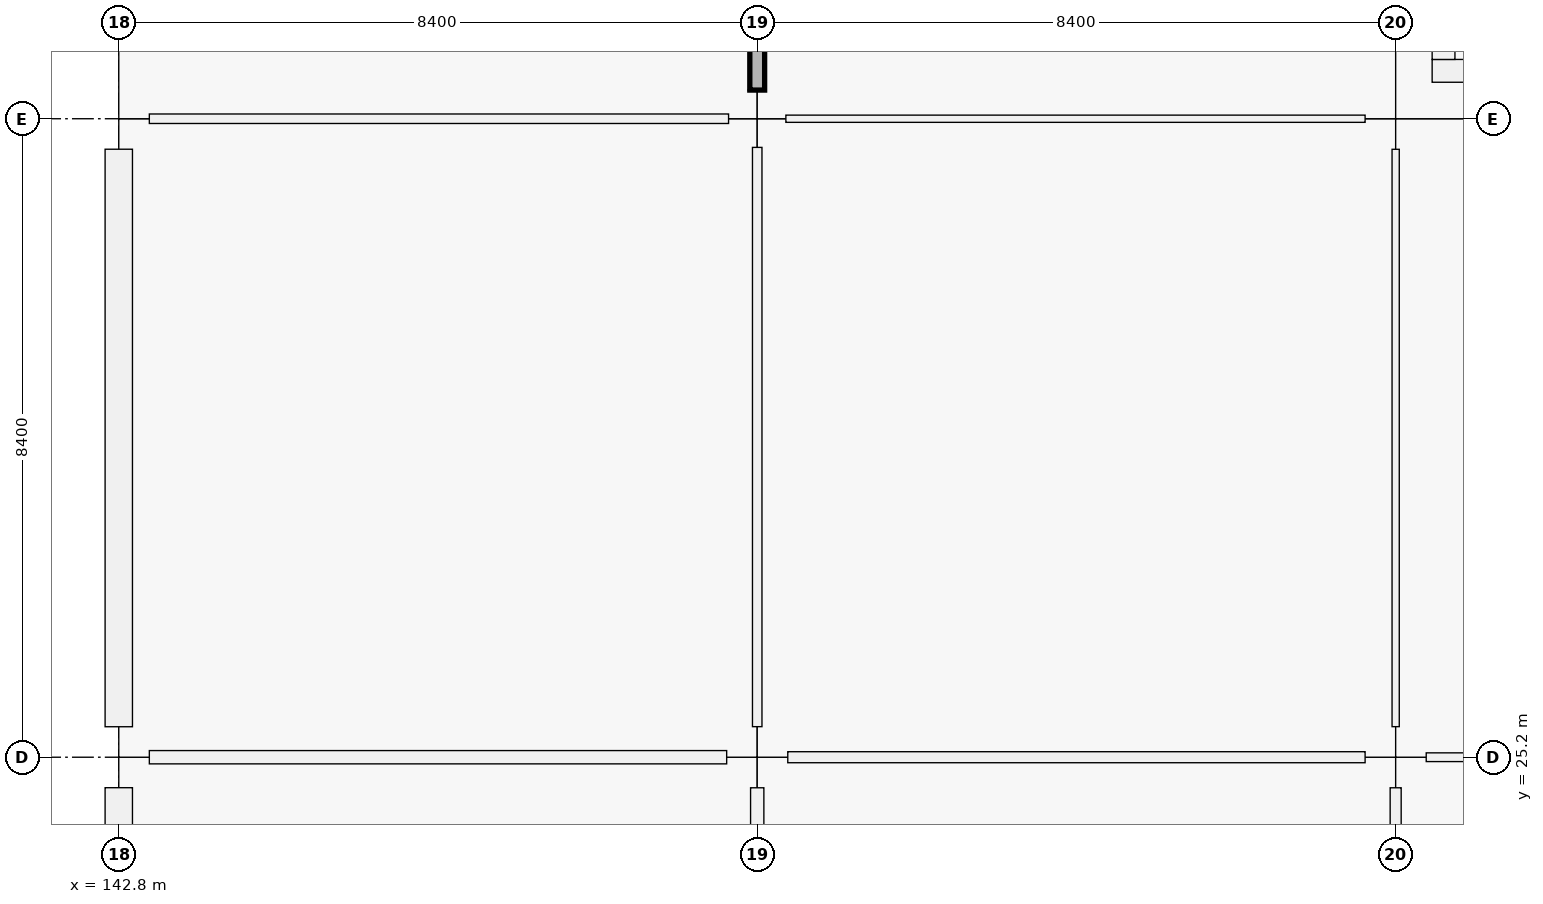
"""IFC4 building model, lengths in metres.
Left out: names, types, materials, properties, quantities, classifications, styles, units other than length and angle.
Written with IfcOpenShell. Run it as: python <this file> out.ifc"""

import sys

from ifc_helpers import new_model, si_unit, direction, frame, frame_2d, origin, origin_2d, place, context, subcontext, project, spatial, rectangle, extrude, element, fill, save


model = new_model("IFC4")
c1 = context("Model", 3, precision=1e-05, world=origin(), true_north=direction((0.0, 1.0)))
c2 = subcontext(c1, "Body", "Model", "MODEL_VIEW")
j1 = project(units=[si_unit("LENGTHUNIT", "METRE"), si_unit("PLANEANGLEUNIT", "RADIAN")], contexts=[c1])
p1 = place(None, origin())
s1 = spatial("IfcSite", under=j1, at=p1, CompositionType="ELEMENT")
p2 = place(p1, origin())
s2 = spatial("IfcBuilding", under=s1, at=p2, CompositionType="ELEMENT")
p3 = place(p2, origin())
s3 = spatial("IfcBuildingStorey", under=s2, at=p3, CompositionType="ELEMENT", Elevation=0.0)
for number, where, z_axis, x_axis in (
    (1, (142.8, 25.2, 0.0), (0.0, 0.0, 1.0), (1.0, 0.0, 0.0)),
    (2, (142.8, 33.6, 0.0), (0.0, 0.0, 1.0), (1.0, 0.0, 0.0)),
    (3, (151.2, 25.2, 0.0), (0.0, 0.0, 1.0), (1.0, 0.0, 0.0)),
):
    element("IfcColumn", number, at=place(p3, frame(where, z_axis=z_axis, x_axis=x_axis)), inside=s3, PredefinedType="COLUMN", context=c2, shape_type="SweptSolid", body=[
        extrude(rectangle(XDim=0.8, YDim=0.8, at=origin_2d()), origin(), (0.0, 0.0, 1.0), 5.76),
    ])
p4 = place(p3, frame((151.2, 33.6, 0.0), z_axis=(0.0, 0.0, 1.0), x_axis=(1.0, 0.0, 0.0)))
e4 = element("IfcColumn", 4, at=p4, inside=s3, PredefinedType="COLUMN", context=c2, shape_type="SweptSolid", body=[
    extrude(rectangle(XDim=0.75, YDim=0.75, at=origin_2d()), origin(), (0.0, 0.0, 1.0), 5.51),
])
for number, where, z_axis, x_axis in (
    (5, (159.6, 25.2, 0.0), (0.0, 0.0, 1.0), (1.0, 0.0, 0.0)),
    (6, (159.6, 33.6, 0.0), (0.0, 0.0, 1.0), (1.0, 0.0, 0.0)),
):
    element("IfcColumn", number, at=place(p3, frame(where, z_axis=z_axis, x_axis=x_axis)), inside=s3, PredefinedType="COLUMN", context=c2, shape_type="SweptSolid", body=[
        extrude(rectangle(XDim=0.8, YDim=0.8, at=origin_2d()), origin(), (0.0, 0.0, 1.0), 5.76),
    ])
p5 = place(p3, frame((142.8, 17.201, 0.0), z_axis=(0.0, 0.0, 1.0), x_axis=(0.0, 1.0, 0.0)))
e7 = element("IfcWall", 7, at=p5, inside=s3, PredefinedType="SOLIDWALL", context=c2, shape_type="SweptSolid", body=[
    extrude(rectangle(XDim=7.598, YDim=0.36, at=frame_2d((3.799, 0.0))), origin(), (0.0, 0.0, 1.0), 4.7),
])
p6 = place(p5, frame((3.024, 0.0, 0.9)))
e8 = element("IfcOpeningElement", 8, at=p6, cuts=e7, PredefinedType="OPENING", context=c2, shape_type="SweptSolid", body=[
    extrude(rectangle(XDim=1.55, YDim=1.6, at=frame_2d((0.775, 0.8))), frame((0.0, 0.18, 0.0), z_axis=(0.0, -1.0, 0.0), x_axis=(1.0, 0.0, 0.0)), (0.0, 0.0, 1.0), 0.36),
])
p7 = place(p3, frame((142.8, 25.601, 0.0), z_axis=(0.0, 0.0, 1.0), x_axis=(0.0, 1.0, 0.0)))
e9 = element("IfcWall", 9, at=p7, inside=s3, PredefinedType="SOLIDWALL", context=c2, shape_type="SweptSolid", body=[
    extrude(rectangle(XDim=7.598, YDim=0.36, at=frame_2d((3.799, 0.0))), origin(), (0.0, 0.0, 1.0), 4.7),
])
p8 = place(p7, frame((2.774, 0.0, 0.9)))
e10 = element("IfcOpeningElement", 10, at=p8, cuts=e9, PredefinedType="OPENING", context=c2, shape_type="SweptSolid", body=[
    extrude(rectangle(XDim=2.05, YDim=1.45, at=frame_2d((1.025, 0.725))), frame((0.0, 0.18, 0.0), z_axis=(0.0, -1.0, 0.0), x_axis=(1.0, 0.0, 0.0)), (0.0, 0.0, 1.0), 0.36),
])
p9 = place(p3, frame((167.52, 34.23, 0.0), z_axis=(0.0, 0.0, 1.0), x_axis=(-1.0, 0.0, 0.0)))
e11 = element("IfcWall", 11, at=p9, inside=s3, PredefinedType="SHEAR", context=c2, shape_type="SweptSolid", body=[
    extrude(rectangle(XDim=7.44, YDim=0.3, at=frame_2d((3.72, 0.0))), origin(), (0.0, 0.0, 1.0), 5.76),
])
p10 = place(p9, frame((1.28, 0.0, 0.0)))
e12 = element("IfcOpeningElement", 12, at=p10, cuts=e11, PredefinedType="OPENING", context=c2, shape_type="SweptSolid", body=[
    extrude(rectangle(XDim=1.5, YDim=2.15, at=frame_2d((0.75, 1.075))), frame((0.0, 0.15, 0.0), z_axis=(0.0, -1.0, 0.0), x_axis=(1.0, 0.0, 0.0)), (0.0, 0.0, 1.0), 0.3),
])
p11 = place(p3, frame((160.23, 34.38, 0.0), z_axis=(0.0, 0.0, 1.0), x_axis=(0.0, 1.0, 0.0)))
e13 = element("IfcWall", 13, at=p11, inside=s3, PredefinedType="SHEAR", context=c2, shape_type="SweptSolid", body=[
    extrude(rectangle(XDim=6.84, YDim=0.3, at=frame_2d((3.42, 0.0))), origin(), (0.0, 0.0, 1.0), 5.76),
])
p12 = place(p3, frame((143.202, 25.2, 0.0), z_axis=(0.0, 0.0, 1.0), x_axis=(1.0, 0.0, 0.0)))
e14 = element("IfcWall", 14, at=p12, inside=s3, PredefinedType="PARTITIONING", context=c2, shape_type="SweptSolid", body=[
    extrude(rectangle(XDim=7.596, YDim=0.175, at=frame_2d((3.798, 0.0))), origin(), (0.0, 0.0, 1.0), 3.66),
])
p13 = place(p12, frame((3.333, 0.0, 0.0)))
e15 = element("IfcOpeningElement", 15, at=p13, cuts=e14, PredefinedType="OPENING", context=c2, shape_type="SweptSolid", body=[
    extrude(rectangle(XDim=0.93, YDim=2.12, at=frame_2d((0.465, 1.06))), frame((0.0, 0.087, 0.0), z_axis=(0.0, -1.0, 0.0), x_axis=(1.0, 0.0, 0.0)), (0.0, 0.0, 1.0), 0.175),
])
p14 = place(p3, frame((143.202, 33.6, 0.0), z_axis=(0.0, 0.0, 1.0), x_axis=(1.0, 0.0, 0.0)))
e16 = element("IfcWall", 16, at=p14, inside=s3, PredefinedType="PARTITIONING", context=c2, shape_type="SweptSolid", body=[
    extrude(rectangle(XDim=7.621, YDim=0.125, at=frame_2d((3.811, 0.0))), origin(), (0.0, 0.0, 1.0), 3.66),
])
p15 = place(p14, frame((3.271, 0.0, 0.0)))
e17 = element("IfcOpeningElement", 17, at=p15, cuts=e16, PredefinedType="OPENING", context=c2, shape_type="SweptSolid", body=[
    extrude(rectangle(XDim=1.08, YDim=2.25, at=frame_2d((0.54, 1.125))), frame((0.0, 0.062, 0.0), z_axis=(0.0, -1.0, 0.0), x_axis=(1.0, 0.0, 0.0)), (0.0, 0.0, 1.0), 0.125),
])
p16 = place(p3, frame((151.602, 25.2, 0.0), z_axis=(0.0, 0.0, 1.0), x_axis=(1.0, 0.0, 0.0)))
e18 = element("IfcWall", 18, at=p16, inside=s3, PredefinedType="PARTITIONING", context=c2, shape_type="SweptSolid", body=[
    extrude(rectangle(XDim=7.596, YDim=0.145, at=frame_2d((3.798, 0.0))), origin(), (0.0, 0.0, 1.0), 3.66),
])
p17 = place(p16, frame((3.278, 0.0, 0.0)))
e19 = element("IfcOpeningElement", 19, at=p17, cuts=e18, PredefinedType="OPENING", context=c2, shape_type="SweptSolid", body=[
    extrude(rectangle(XDim=1.04, YDim=2.2, at=frame_2d((0.52, 1.1))), frame((0.0, 0.073, 0.0), z_axis=(0.0, -1.0, 0.0), x_axis=(1.0, 0.0, 0.0)), (0.0, 0.0, 1.0), 0.145),
])
p18 = place(p3, frame((151.577, 33.6, 0.0), z_axis=(0.0, 0.0, 1.0), x_axis=(1.0, 0.0, 0.0)))
e20 = element("IfcWall", 20, at=p18, inside=s3, PredefinedType="PARTITIONING", context=c2, shape_type="SweptSolid", body=[
    extrude(rectangle(XDim=7.621, YDim=0.095, at=frame_2d((3.811, 0.0))), origin(), (0.0, 0.0, 1.0), 3.66),
])
p19 = place(p18, frame((3.311, 0.0, 0.0)))
e21 = element("IfcOpeningElement", 21, at=p19, cuts=e20, PredefinedType="OPENING", context=c2, shape_type="SweptSolid", body=[
    extrude(rectangle(XDim=1.0, YDim=2.2, at=frame_2d((0.5, 1.1))), frame((0.0, 0.047, 0.0), z_axis=(0.0, -1.0, 0.0), x_axis=(1.0, 0.0, 0.0)), (0.0, 0.0, 1.0), 0.095),
])
p20 = place(p3, frame((160.002, 25.2, 0.0), z_axis=(0.0, 0.0, 1.0), x_axis=(1.0, 0.0, 0.0)))
e22 = element("IfcWall", 22, at=p20, inside=s3, PredefinedType="PARTITIONING", context=c2, shape_type="SweptSolid", body=[
    extrude(rectangle(XDim=7.596, YDim=0.115, at=frame_2d((3.798, 0.0))), origin(), (0.0, 0.0, 1.0), 3.66),
])
p21 = place(p20, frame((3.268, 0.0, 0.0)))
e23 = element("IfcOpeningElement", 23, at=p21, cuts=e22, PredefinedType="OPENING", context=c2, shape_type="SweptSolid", body=[
    extrude(rectangle(XDim=1.06, YDim=2.25, at=frame_2d((0.53, 1.125))), frame((0.0, 0.058, 0.0), z_axis=(0.0, -1.0, 0.0), x_axis=(1.0, 0.0, 0.0)), (0.0, 0.0, 1.0), 0.115),
])
p22 = place(p3, frame((151.2, 17.202, 0.0), z_axis=(0.0, 0.0, 1.0), x_axis=(0.0, 1.0, 0.0)))
e24 = element("IfcWall", 24, at=p22, inside=s3, PredefinedType="PARTITIONING", context=c2, shape_type="SweptSolid", body=[
    extrude(rectangle(XDim=7.596, YDim=0.175, at=frame_2d((3.798, 0.0))), origin(), (0.0, 0.0, 1.0), 3.66),
])
p23 = place(p22, frame((3.278, 0.0, 0.0)))
e25 = element("IfcOpeningElement", 25, at=p23, cuts=e24, PredefinedType="OPENING", context=c2, shape_type="SweptSolid", body=[
    extrude(rectangle(XDim=1.04, YDim=2.2, at=frame_2d((0.52, 1.1))), frame((0.0, 0.087, 0.0), z_axis=(0.0, -1.0, 0.0), x_axis=(1.0, 0.0, 0.0)), (0.0, 0.0, 1.0), 0.175),
])
p24 = place(p3, frame((151.2, 25.602, 0.0), z_axis=(0.0, 0.0, 1.0), x_axis=(0.0, 1.0, 0.0)))
e26 = element("IfcWall", 26, at=p24, inside=s3, PredefinedType="PARTITIONING", context=c2, shape_type="SweptSolid", body=[
    extrude(rectangle(XDim=7.621, YDim=0.125, at=frame_2d((3.811, 0.0))), origin(), (0.0, 0.0, 1.0), 3.66),
])
p25 = place(p24, frame((3.301, 0.0, 0.0)))
e27 = element("IfcOpeningElement", 27, at=p25, cuts=e26, PredefinedType="OPENING", context=c2, shape_type="SweptSolid", body=[
    extrude(rectangle(XDim=1.02, YDim=2.2, at=frame_2d((0.51, 1.1))), frame((0.0, 0.062, 0.0), z_axis=(0.0, -1.0, 0.0), x_axis=(1.0, 0.0, 0.0)), (0.0, 0.0, 1.0), 0.125),
])
p26 = place(p3, frame((151.2, 33.977, 0.0), z_axis=(0.0, 0.0, 1.0), x_axis=(0.0, 1.0, 0.0)))
e28 = element("IfcWall", 28, at=p26, inside=s3, PredefinedType="PARTITIONING", context=c2, shape_type="SweptSolid", body=[
    extrude(rectangle(XDim=7.671, YDim=0.195, at=frame_2d((3.835, 0.0))), origin(), (0.0, 0.0, 1.0), 3.66),
])
p27 = place(p26, frame((3.336, 0.0, 0.0)))
e29 = element("IfcOpeningElement", 29, at=p27, cuts=e28, PredefinedType="OPENING", context=c2, shape_type="SweptSolid", body=[
    extrude(rectangle(XDim=1.0, YDim=2.2, at=frame_2d((0.5, 1.1))), frame((0.0, 0.098, 0.0), z_axis=(0.0, -1.0, 0.0), x_axis=(1.0, 0.0, 0.0)), (0.0, 0.0, 1.0), 0.195),
])
p28 = place(p3, frame((159.6, 17.202, 0.0), z_axis=(0.0, 0.0, 1.0), x_axis=(0.0, 1.0, 0.0)))
e30 = element("IfcWall", 30, at=p28, inside=s3, PredefinedType="PARTITIONING", context=c2, shape_type="SweptSolid", body=[
    extrude(rectangle(XDim=7.596, YDim=0.145, at=frame_2d((3.798, 0.0))), origin(), (0.0, 0.0, 1.0), 3.66),
])
p29 = place(p28, frame((3.273, 0.0, 0.0)))
e31 = element("IfcOpeningElement", 31, at=p29, cuts=e30, PredefinedType="OPENING", context=c2, shape_type="SweptSolid", body=[
    extrude(rectangle(XDim=1.05, YDim=2.12, at=frame_2d((0.525, 1.06))), frame((0.0, 0.073, 0.0), z_axis=(0.0, -1.0, 0.0), x_axis=(1.0, 0.0, 0.0)), (0.0, 0.0, 1.0), 0.145),
])
p30 = place(p3, frame((159.6, 25.602, 0.0), z_axis=(0.0, 0.0, 1.0), x_axis=(0.0, 1.0, 0.0)))
e32 = element("IfcWall", 32, at=p30, inside=s3, PredefinedType="PARTITIONING", context=c2, shape_type="SweptSolid", body=[
    extrude(rectangle(XDim=7.596, YDim=0.095, at=frame_2d((3.798, 0.0))), origin(), (0.0, 0.0, 1.0), 3.66),
])
p31 = place(p30, frame((3.328, 0.0, 0.0)))
e33 = element("IfcOpeningElement", 33, at=p31, cuts=e32, PredefinedType="OPENING", context=c2, shape_type="SweptSolid", body=[
    extrude(rectangle(XDim=0.94, YDim=2.15, at=frame_2d((0.47, 1.075))), frame((0.0, 0.047, 0.0), z_axis=(0.0, -1.0, 0.0), x_axis=(1.0, 0.0, 0.0)), (0.0, 0.0, 1.0), 0.095),
])
p32 = place(p8, origin())
e34 = element("IfcWindow", 34, at=p32, inside=s3, PartitioningType="SINGLE_PANEL", PredefinedType="WINDOW", context=c2, shape_type="SweptSolid", body=[
    extrude(rectangle(XDim=2.05, YDim=1.45, at=frame_2d((1.025, 0.725))), frame((0.0, 0.03, 0.0), z_axis=(0.0, -1.0, 0.0), x_axis=(1.0, 0.0, 0.0)), (0.0, 0.0, 1.0), 0.06),
])
fill(e10, e34)
p33 = place(p31, origin())
e35 = element("IfcDoor", 35, at=p33, inside=s3, OperationType="SINGLE_SWING_RIGHT", PredefinedType="DOOR", context=c2, shape_type="SweptSolid", body=[
    extrude(rectangle(XDim=0.94, YDim=2.15, at=frame_2d((0.47, 1.075))), frame((0.0, 0.025, 0.0), z_axis=(0.0, -1.0, 0.0), x_axis=(1.0, 0.0, 0.0)), (0.0, 0.0, 1.0), 0.05),
])
fill(e33, e35)
p34 = place(p13, origin())
e36 = element("IfcDoor", 36, at=p34, inside=s3, OperationType="SINGLE_SWING_RIGHT", PredefinedType="DOOR", context=c2, shape_type="SweptSolid", body=[
    extrude(rectangle(XDim=0.93, YDim=2.12, at=frame_2d((0.465, 1.06))), frame((0.0, 0.025, 0.0), z_axis=(0.0, -1.0, 0.0), x_axis=(1.0, 0.0, 0.0)), (0.0, 0.0, 1.0), 0.05),
])
fill(e15, e36)
p35 = place(p15, origin())
e37 = element("IfcDoor", 37, at=p35, inside=s3, OperationType="SINGLE_SWING_LEFT", PredefinedType="DOOR", context=c2, shape_type="SweptSolid", body=[
    extrude(rectangle(XDim=1.08, YDim=2.25, at=frame_2d((0.54, 1.125))), frame((0.0, 0.025, 0.0), z_axis=(0.0, -1.0, 0.0), x_axis=(1.0, 0.0, 0.0)), (0.0, 0.0, 1.0), 0.05),
])
fill(e17, e37)
p36 = place(p19, origin())
e38 = element("IfcDoor", 38, at=p36, inside=s3, OperationType="SINGLE_SWING_LEFT", PredefinedType="DOOR", context=c2, shape_type="SweptSolid", body=[
    extrude(rectangle(XDim=1.0, YDim=2.2, at=frame_2d((0.5, 1.1))), frame((0.0, 0.025, 0.0), z_axis=(0.0, -1.0, 0.0), x_axis=(1.0, 0.0, 0.0)), (0.0, 0.0, 1.0), 0.05),
])
fill(e21, e38)
p37 = place(p17, origin())
e39 = element("IfcDoor", 39, at=p37, inside=s3, OperationType="SINGLE_SWING_LEFT", PredefinedType="DOOR", context=c2, shape_type="SweptSolid", body=[
    extrude(rectangle(XDim=1.04, YDim=2.2, at=frame_2d((0.52, 1.1))), frame((0.0, 0.025, 0.0), z_axis=(0.0, -1.0, 0.0), x_axis=(1.0, 0.0, 0.0)), (0.0, 0.0, 1.0), 0.05),
])
fill(e19, e39)
p38 = place(p25, origin())
e40 = element("IfcDoor", 40, at=p38, inside=s3, OperationType="SINGLE_SWING_LEFT", PredefinedType="DOOR", context=c2, shape_type="SweptSolid", body=[
    extrude(rectangle(XDim=1.02, YDim=2.2, at=frame_2d((0.51, 1.1))), frame((0.0, 0.025, 0.0), z_axis=(0.0, -1.0, 0.0), x_axis=(1.0, 0.0, 0.0)), (0.0, 0.0, 1.0), 0.05),
])
fill(e27, e40)
save(model, sys.argv[1])
